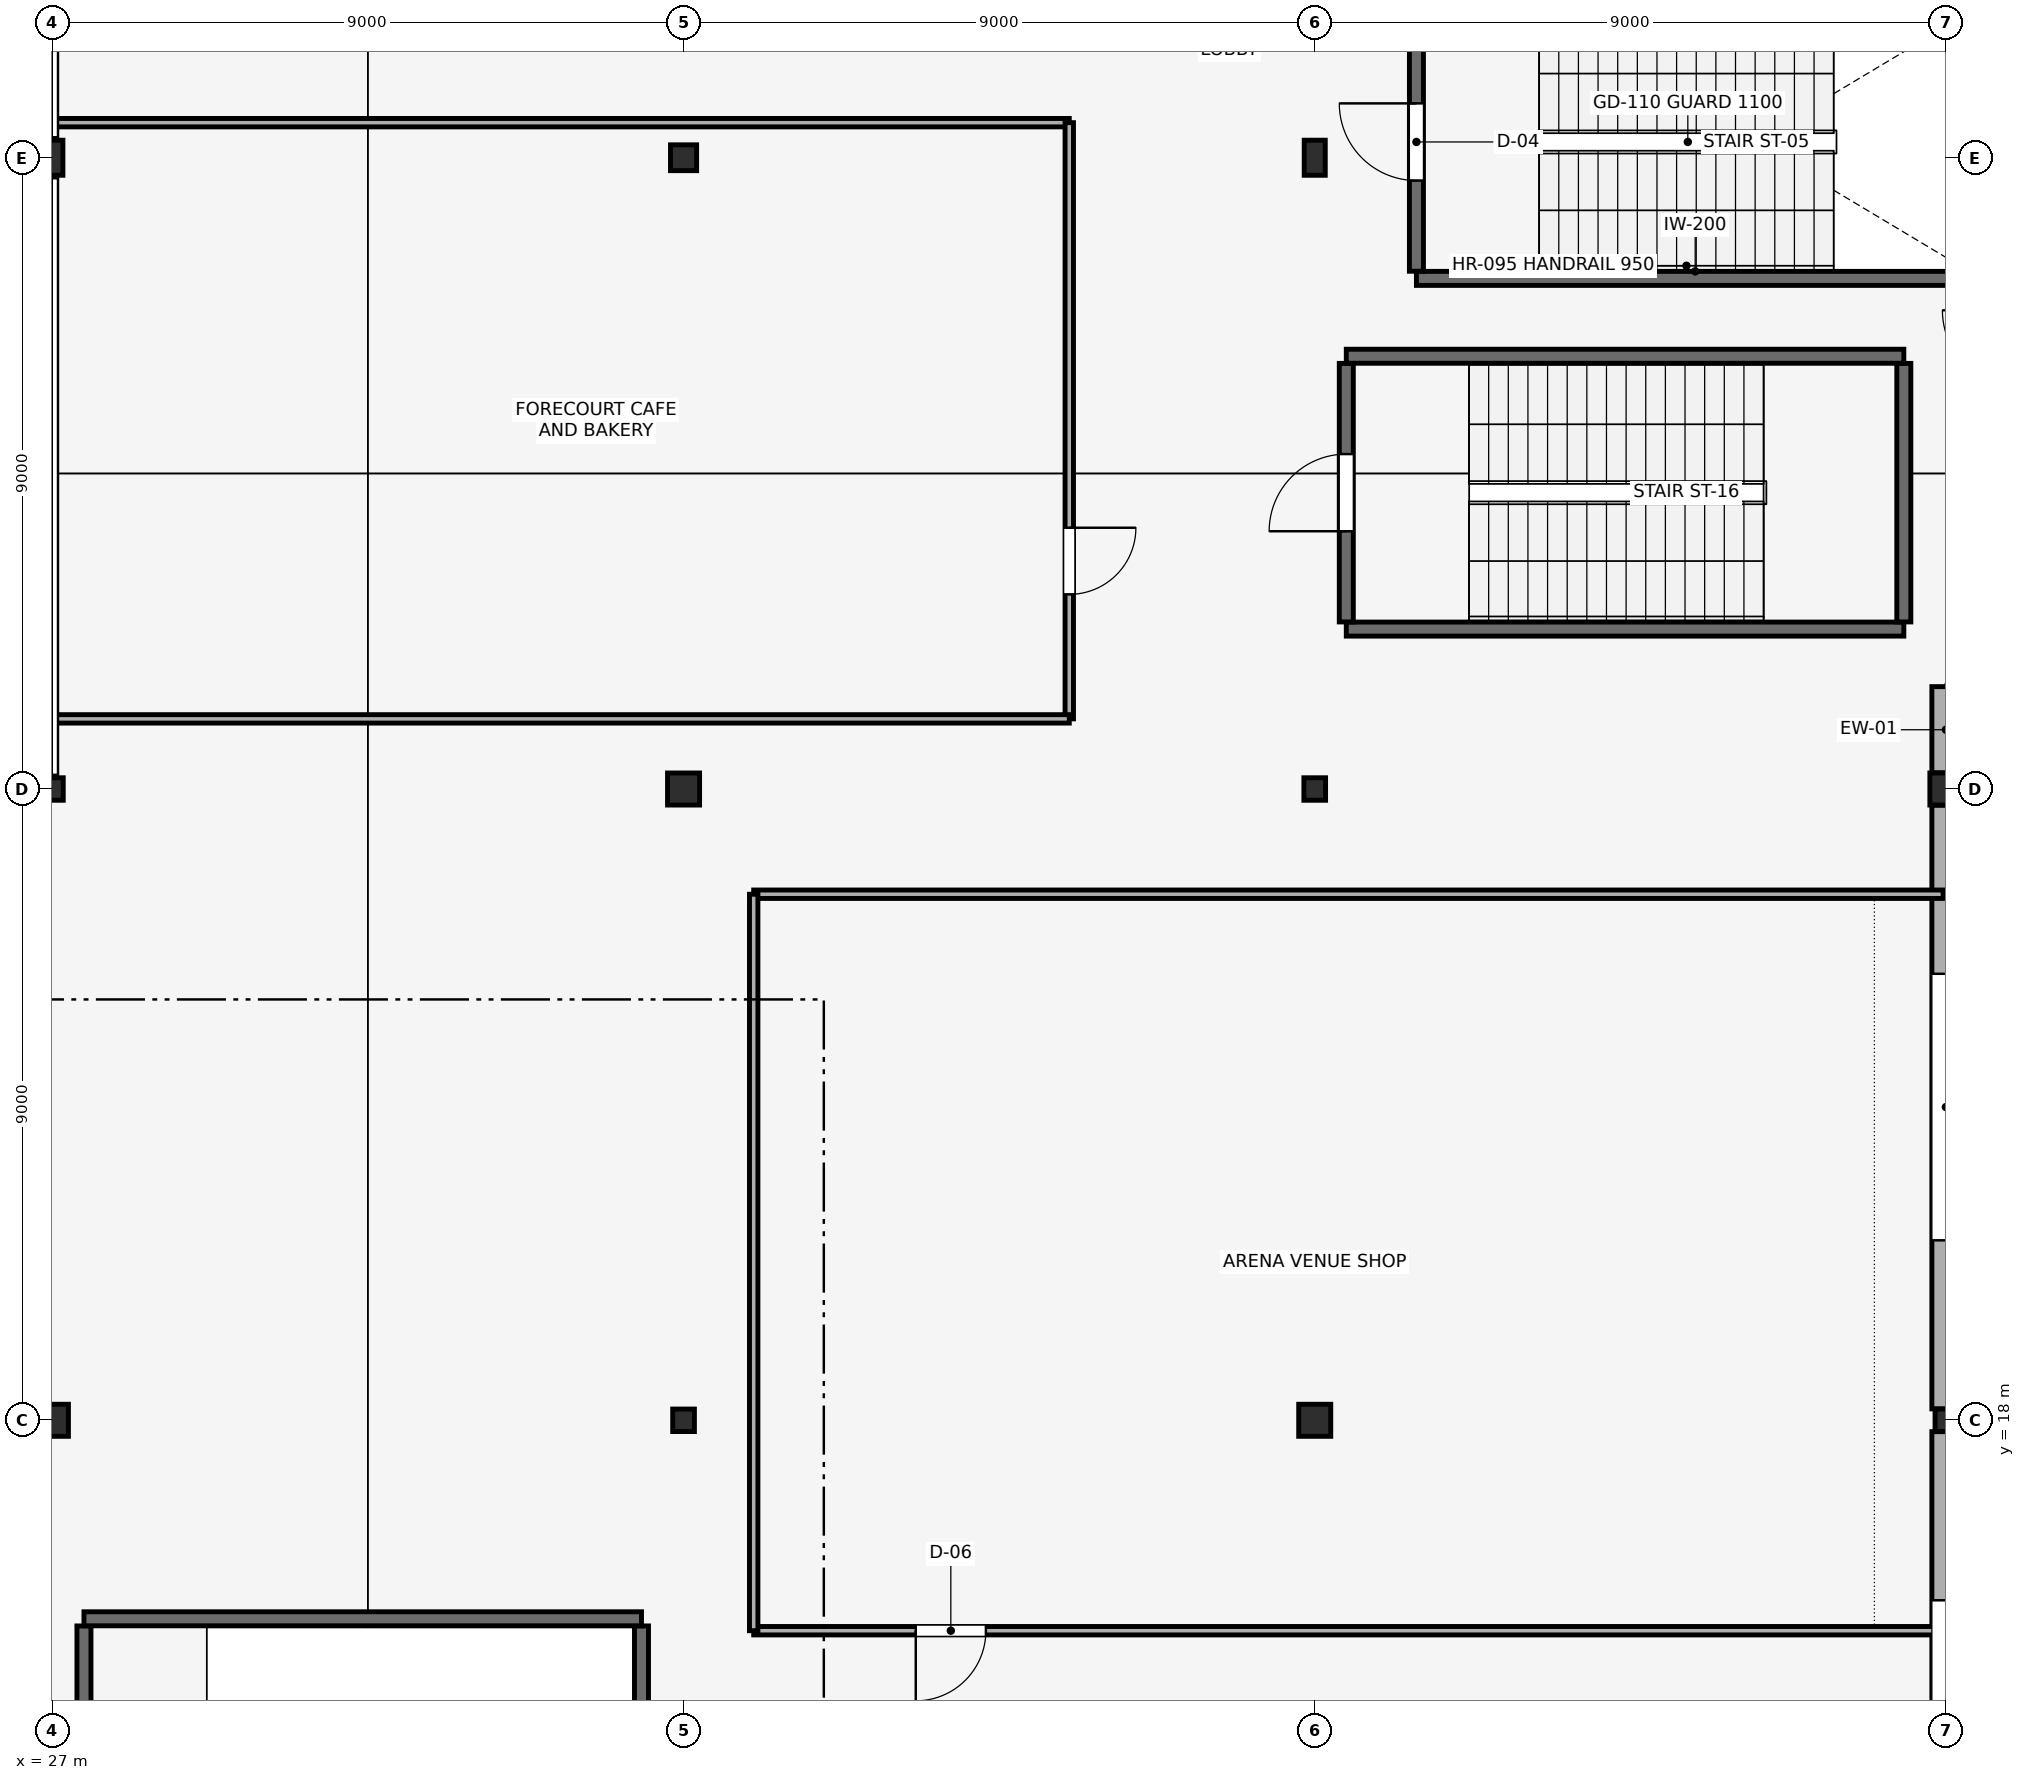
"""IFC4 building model, lengths in metres.
Left out: names, types, materials, properties, quantities, classifications, styles, units other than length and angle.
Written with IfcOpenShell. Run it as: python <this file> out.ifc"""

import sys

from ifc_helpers import new_model, si_unit, direction, frame, frame_2d, origin, origin_2d, place, context, subcontext, project, spatial, rectangle, hollow_circle, i_section, extrude, element, fill, save


model = new_model("IFC4")
c1 = context("Model", 3, precision=1e-05, world=origin(), true_north=direction((0.0, 1.0)))
c2 = subcontext(c1, "Body", "Model", "MODEL_VIEW")
j1 = project(units=[si_unit("LENGTHUNIT", "METRE"), si_unit("PLANEANGLEUNIT", "RADIAN")], contexts=[c1])
p1 = place(None, origin())
s1 = spatial("IfcSite", under=j1, at=p1, CompositionType="ELEMENT")
p2 = place(p1, origin())
s2 = spatial("IfcBuilding", under=s1, at=p2, CompositionType="ELEMENT")
p3 = place(p2, origin())
s3 = spatial("IfcBuildingStorey", under=s2, at=p3, CompositionType="ELEMENT", Elevation=0.0)
p4 = place(p3, frame((27.0, 18.0, 0.0), z_axis=(0.0, 0.0, 1.0), x_axis=(1.0, 0.0, 0.0)))
e1 = element("IfcColumn", 1, at=p4, inside=s3, PredefinedType="COLUMN", context=c2, shape_type="SweptSolid", body=[
    extrude(hollow_circle(Radius=0.229, WallThickness=0.02, at=origin_2d()), origin(), (0.0, 0.0, 1.0), 5.4),
])
p5 = place(p3, frame((27.0, 27.0, 0.0), z_axis=(0.0, 0.0, 1.0), x_axis=(1.0, 0.0, 0.0)))
e2 = element("IfcColumn", 2, at=p5, inside=s3, PredefinedType="COLUMN", context=c2, shape_type="SweptSolid", body=[
    extrude(i_section(OverallWidth=0.309, OverallDepth=0.321, WebThickness=0.014, FlangeThickness=0.022, FilletRadius=0.015, at=origin_2d()), origin(), (0.0, 0.0, 1.0), 5.4),
])
p6 = place(p3, frame((27.0, 36.0, 0.0), z_axis=(0.0, 0.0, 1.0), x_axis=(1.0, 0.0, 0.0)))
e3 = element("IfcColumn", 3, at=p6, inside=s3, PredefinedType="COLUMN", context=c2, shape_type="SweptSolid", body=[
    extrude(i_section(OverallWidth=0.3, OverallDepth=0.5, WebThickness=0.014, FlangeThickness=0.028, FilletRadius=0.027, at=origin_2d()), origin(), (0.0, 0.0, 1.0), 5.4),
])
p7 = place(p3, frame((36.0, 18.0, 0.0), z_axis=(0.0, 0.0, 1.0), x_axis=(1.0, 0.0, 0.0)))
e4 = element("IfcColumn", 4, at=p7, inside=s3, PredefinedType="COLUMN", context=c2, shape_type="SweptSolid", body=[
    extrude(i_section(OverallWidth=0.309, OverallDepth=0.321, WebThickness=0.014, FlangeThickness=0.022, FilletRadius=0.015, at=origin_2d()), origin(), (0.0, 0.0, 1.0), 5.4),
])
p8 = place(p3, frame((36.0, 27.0, 0.0), z_axis=(0.0, 0.0, 1.0), x_axis=(1.0, 0.0, 0.0)))
e5 = element("IfcColumn", 5, at=p8, inside=s3, PredefinedType="COLUMN", context=c2, shape_type="SweptSolid", body=[
    extrude(hollow_circle(Radius=0.229, WallThickness=0.02, at=origin_2d()), origin(), (0.0, 0.0, 1.0), 5.4),
])
p9 = place(p3, frame((36.0, 36.0, 0.0), z_axis=(0.0, 0.0, 1.0), x_axis=(1.0, 0.0, 0.0)))
e6 = element("IfcColumn", 6, at=p9, inside=s3, PredefinedType="COLUMN", context=c2, shape_type="SweptSolid", body=[
    extrude(i_section(OverallWidth=0.373, OverallDepth=0.368, WebThickness=0.014, FlangeThickness=0.024, FilletRadius=0.015, at=origin_2d()), origin(), (0.0, 0.0, 1.0), 5.4),
])
p10 = place(p3, frame((45.0, 18.0, 0.0), z_axis=(0.0, 0.0, 1.0), x_axis=(1.0, 0.0, 0.0)))
e7 = element("IfcColumn", 7, at=p10, inside=s3, PredefinedType="COLUMN", context=c2, shape_type="SweptSolid", body=[
    extrude(hollow_circle(Radius=0.229, WallThickness=0.02, at=origin_2d()), origin(), (0.0, 0.0, 1.0), 5.4),
])
p11 = place(p3, frame((45.0, 27.0, 0.0), z_axis=(0.0, 0.0, 1.0), x_axis=(1.0, 0.0, 0.0)))
e8 = element("IfcColumn", 8, at=p11, inside=s3, PredefinedType="COLUMN", context=c2, shape_type="SweptSolid", body=[
    extrude(i_section(OverallWidth=0.309, OverallDepth=0.321, WebThickness=0.014, FlangeThickness=0.022, FilletRadius=0.015, at=origin_2d()), origin(), (0.0, 0.0, 1.0), 5.4),
])
p12 = place(p3, frame((45.0, 36.0, 0.0), z_axis=(0.0, 0.0, 1.0), x_axis=(1.0, 0.0, 0.0)))
e9 = element("IfcColumn", 9, at=p12, inside=s3, PredefinedType="COLUMN", context=c2, shape_type="SweptSolid", body=[
    extrude(i_section(OverallWidth=0.3, OverallDepth=0.5, WebThickness=0.014, FlangeThickness=0.028, FilletRadius=0.027, at=origin_2d()), origin(), (0.0, 0.0, 1.0), 5.4),
])
p13 = place(p3, frame((54.0, 18.0, 0.0), z_axis=(0.0, 0.0, 1.0), x_axis=(1.0, 0.0, 0.0)))
e10 = element("IfcColumn", 10, at=p13, inside=s3, PredefinedType="COLUMN", context=c2, shape_type="SweptSolid", body=[
    extrude(i_section(OverallWidth=0.309, OverallDepth=0.321, WebThickness=0.014, FlangeThickness=0.022, FilletRadius=0.015, at=origin_2d()), origin(), (0.0, 0.0, 1.0), 5.4),
])
p14 = place(p3, frame((54.0, 27.0, 0.0), z_axis=(0.0, 0.0, 1.0), x_axis=(1.0, 0.0, 0.0)))
e11 = element("IfcColumn", 11, at=p14, inside=s3, PredefinedType="COLUMN", context=c2, shape_type="SweptSolid", body=[
    extrude(hollow_circle(Radius=0.229, WallThickness=0.02, at=origin_2d()), origin(), (0.0, 0.0, 1.0), 5.4),
])
p15 = place(p3, frame((60.381, 25.692, 0.0), z_axis=(0.0, 0.0, 1.0), x_axis=(-0.917435204173, 0.397885217298, 0.0)))
e12 = element("IfcWall", 12, at=p15, inside=s3, PredefinedType="STANDARD", context=c2, shape_type="SweptSolid", body=[
    extrude(rectangle(XDim=6.955, YDim=0.4, at=frame_2d((3.478, 0.0))), origin(), (0.0, 0.0, 1.0), 5.12),
])
p16 = place(p15, frame((1.578, 0.0, 0.0)))
e13 = element("IfcOpeningElement", 13, at=p16, cuts=e12, PredefinedType="OPENING", context=c2, shape_type="SweptSolid", body=[
    extrude(rectangle(XDim=3.8, YDim=2.8, at=frame_2d((1.9, 1.4))), frame((0.0, 0.21, 0.0), z_axis=(0.0, -1.0, 0.0), x_axis=(1.0, 0.0, 0.0)), (0.0, 0.0, 1.0), 0.42),
])
p17 = place(p3, frame((54.0, 28.46, 0.0), z_axis=(0.0, 0.0, 1.0), x_axis=(0.0, -1.0, 0.0)))
e14 = element("IfcWall", 14, at=p17, inside=s3, PredefinedType="STANDARD", context=c2, shape_type="SweptSolid", body=[
    extrude(rectangle(XDim=1.229, YDim=0.4, at=frame_2d((0.615, 0.0))), origin(), (0.0, 0.0, 1.0), 5.12),
])
p18 = place(p3, frame((54.0, 26.77, 0.0), z_axis=(0.0, 0.0, 1.0), x_axis=(0.0, -1.0, 0.0)))
e15 = element("IfcWall", 15, at=p18, inside=s3, PredefinedType="STANDARD", context=c2, shape_type="SweptSolid", body=[
    extrude(rectangle(XDim=8.607, YDim=0.4, at=frame_2d((4.304, 0.0))), origin(), (0.0, 0.0, 1.0), 4.815),
])
p19 = place(p18, frame((2.404, 0.0, 0.0)))
e16 = element("IfcOpeningElement", 16, at=p19, cuts=e15, PredefinedType="OPENING", context=c2, shape_type="SweptSolid", body=[
    extrude(rectangle(XDim=3.8, YDim=2.8, at=frame_2d((1.9, 1.4))), frame((0.0, 0.21, 0.0), z_axis=(0.0, -1.0, 0.0), x_axis=(1.0, 0.0, 0.0)), (0.0, 0.0, 1.0), 0.42),
])
p20 = place(p3, frame((54.0, 17.838, 0.0), z_axis=(0.0, 0.0, 1.0), x_axis=(0.0, -1.0, 0.0)))
e17 = element("IfcWall", 17, at=p20, inside=s3, PredefinedType="STANDARD", context=c2, shape_type="SweptSolid", body=[
    extrude(rectangle(XDim=8.607, YDim=0.4, at=frame_2d((4.304, 0.0))), origin(), (0.0, 0.0, 1.0), 4.815),
])
p21 = place(p20, frame((2.404, 0.0, 0.0)))
e18 = element("IfcOpeningElement", 18, at=p21, cuts=e17, PredefinedType="OPENING", context=c2, shape_type="SweptSolid", body=[
    extrude(rectangle(XDim=3.8, YDim=2.8, at=frame_2d((1.9, 1.4))), frame((0.0, 0.21, 0.0), z_axis=(0.0, -1.0, 0.0), x_axis=(1.0, 0.0, 0.0)), (0.0, 0.0, 1.0), 0.42),
])
p22 = place(p3, frame((46.45, 34.28, 0.0), z_axis=(0.0, 0.0, 1.0), x_axis=(1.0, 0.0, 0.0)))
e19 = element("IfcWall", 19, at=p22, inside=s3, PredefinedType="SHEAR", context=c2, shape_type="SweptSolid", body=[
    extrude(rectangle(XDim=7.95, YDim=0.2, at=frame_2d((3.975, 0.0))), origin(), (0.0, 0.0, 1.0), 5.4),
])
p23 = place(p3, frame((46.45, 34.382, 0.0), z_axis=(0.0, 0.0, 1.0), x_axis=(0.0, 1.0, 0.0)))
e20 = element("IfcWall", 20, at=p23, inside=s3, PredefinedType="SHEAR", context=c2, shape_type="SweptSolid", body=[
    extrude(rectangle(XDim=3.686, YDim=0.2, at=frame_2d((1.843, 0.0))), origin(), (0.0, 0.0, 1.0), 5.4),
])
p24 = place(p23, frame((1.293, 0.0, 0.0)))
e21 = element("IfcOpeningElement", 21, at=p24, cuts=e20, PredefinedType="OPENING", context=c2, shape_type="SweptSolid", body=[
    extrude(rectangle(XDim=1.1, YDim=2.15, at=frame_2d((0.55, 1.075))), frame((0.0, 0.11, 0.0), z_axis=(0.0, -1.0, 0.0), x_axis=(1.0, 0.0, 0.0)), (0.0, 0.0, 1.0), 0.22),
])
p25 = place(p3, frame((45.45, 29.28, 0.0), z_axis=(0.0, 0.0, 1.0), x_axis=(1.0, 0.0, 0.0)))
e22 = element("IfcWall", 22, at=p25, inside=s3, PredefinedType="SHEAR", context=c2, shape_type="SweptSolid", body=[
    extrude(rectangle(XDim=7.95, YDim=0.2, at=frame_2d((3.975, 0.0))), origin(), (0.0, 0.0, 1.0), 5.4),
])
p26 = place(p3, frame((45.45, 29.382, 0.0), z_axis=(0.0, 0.0, 1.0), x_axis=(0.0, 1.0, 0.0)))
e23 = element("IfcWall", 23, at=p26, inside=s3, PredefinedType="SHEAR", context=c2, shape_type="SweptSolid", body=[
    extrude(rectangle(XDim=3.686, YDim=0.2, at=frame_2d((1.843, 0.0))), origin(), (0.0, 0.0, 1.0), 5.4),
])
p27 = place(p26, frame((1.293, 0.0, 0.0)))
e24 = element("IfcOpeningElement", 24, at=p27, cuts=e23, PredefinedType="OPENING", context=c2, shape_type="SweptSolid", body=[
    extrude(rectangle(XDim=1.1, YDim=2.15, at=frame_2d((0.55, 1.075))), frame((0.0, 0.11, 0.0), z_axis=(0.0, -1.0, 0.0), x_axis=(1.0, 0.0, 0.0)), (0.0, 0.0, 1.0), 0.22),
])
p28 = place(p3, frame((53.4, 29.382, 0.0), z_axis=(0.0, 0.0, 1.0), x_axis=(0.0, 1.0, 0.0)))
e25 = element("IfcWall", 25, at=p28, inside=s3, PredefinedType="SHEAR", context=c2, shape_type="SweptSolid", body=[
    extrude(rectangle(XDim=3.686, YDim=0.2, at=frame_2d((1.843, 0.0))), origin(), (0.0, 0.0, 1.0), 5.4),
])
p29 = place(p3, frame((45.45, 33.17, 0.0), z_axis=(0.0, 0.0, 1.0), x_axis=(1.0, 0.0, 0.0)))
e26 = element("IfcWall", 26, at=p29, inside=s3, PredefinedType="SHEAR", context=c2, shape_type="SweptSolid", body=[
    extrude(rectangle(XDim=7.95, YDim=0.2, at=frame_2d((3.975, 0.0))), origin(), (0.0, 0.0, 1.0), 5.4),
])
p30 = place(p3, frame((27.45, 11.382, 0.0), z_axis=(0.0, 0.0, 1.0), x_axis=(0.0, 1.0, 0.0)))
e27 = element("IfcWall", 27, at=p30, inside=s3, PredefinedType="SHEAR", context=c2, shape_type="SweptSolid", body=[
    extrude(rectangle(XDim=3.686, YDim=0.2, at=frame_2d((1.843, 0.0))), origin(), (0.0, 0.0, 1.0), 5.4),
])
p31 = place(p30, frame((1.293, 0.0, 0.0)))
e28 = element("IfcOpeningElement", 28, at=p31, cuts=e27, PredefinedType="OPENING", context=c2, shape_type="SweptSolid", body=[
    extrude(rectangle(XDim=1.1, YDim=2.15, at=frame_2d((0.55, 1.075))), frame((0.0, 0.11, 0.0), z_axis=(0.0, -1.0, 0.0), x_axis=(1.0, 0.0, 0.0)), (0.0, 0.0, 1.0), 0.22),
])
p32 = place(p3, frame((35.4, 11.382, 0.0), z_axis=(0.0, 0.0, 1.0), x_axis=(0.0, 1.0, 0.0)))
e29 = element("IfcWall", 29, at=p32, inside=s3, PredefinedType="SHEAR", context=c2, shape_type="SweptSolid", body=[
    extrude(rectangle(XDim=3.686, YDim=0.2, at=frame_2d((1.843, 0.0))), origin(), (0.0, 0.0, 1.0), 5.4),
])
p33 = place(p3, frame((27.45, 15.17, 0.0), z_axis=(0.0, 0.0, 1.0), x_axis=(1.0, 0.0, 0.0)))
e30 = element("IfcWall", 30, at=p33, inside=s3, PredefinedType="SHEAR", context=c2, shape_type="SweptSolid", body=[
    extrude(rectangle(XDim=7.95, YDim=0.2, at=frame_2d((3.975, 0.0))), origin(), (0.0, 0.0, 1.0), 5.4),
])
p34 = place(p3, frame((37.0, 25.5, 0.0), z_axis=(0.0, 0.0, 1.0), x_axis=(1.0, 0.0, 0.0)))
e31 = element("IfcWall", 31, at=p34, inside=s3, PredefinedType="PARTITIONING", context=c2, shape_type="SweptSolid", body=[
    extrude(rectangle(XDim=16.96, YDim=0.12, at=frame_2d((8.48, 0.0))), origin(), (0.0, 0.0, 1.0), 5.12),
])
p35 = place(p3, frame((53.96, 15.0, 0.0), z_axis=(0.0, 0.0, 1.0), x_axis=(-1.0, 0.0, 0.0)))
e32 = element("IfcWall", 32, at=p35, inside=s3, PredefinedType="PARTITIONING", context=c2, shape_type="SweptSolid", body=[
    extrude(rectangle(XDim=16.96, YDim=0.12, at=frame_2d((8.48, 0.0))), origin(), (0.0, 0.0, 1.0), 4.658),
])
p36 = place(p35, frame((13.649, 0.0, 0.0)))
e33 = element("IfcOpeningElement", 33, at=p36, cuts=e32, PredefinedType="OPENING", context=c2, shape_type="SweptSolid", body=[
    extrude(rectangle(XDim=1.0, YDim=2.15, at=frame_2d((0.5, 1.075))), frame((0.0, 0.07, 0.0), z_axis=(0.0, -1.0, 0.0), x_axis=(1.0, 0.0, 0.0)), (0.0, 0.0, 1.0), 0.14),
])
p37 = place(p3, frame((37.0, 15.0, 0.0), z_axis=(0.0, 0.0, 1.0), x_axis=(0.0, 1.0, 0.0)))
e34 = element("IfcWall", 34, at=p37, inside=s3, PredefinedType="PARTITIONING", context=c2, shape_type="SweptSolid", body=[
    extrude(rectangle(XDim=10.5, YDim=0.12, at=frame_2d((5.25, 0.0))), origin(), (0.0, 0.0, 1.0), 5.12),
])
p38 = place(p3, frame((27.02, 36.5, 0.0), z_axis=(0.0, 0.0, 1.0), x_axis=(1.0, 0.0, 0.0)))
e35 = element("IfcWall", 35, at=p38, inside=s3, PredefinedType="PARTITIONING", context=c2, shape_type="SweptSolid", body=[
    extrude(rectangle(XDim=14.48, YDim=0.12, at=frame_2d((7.24, 0.0))), origin(), (0.0, 0.0, 1.0), 5.12),
])
p39 = place(p3, frame((41.5, 36.5, 0.0), z_axis=(0.0, 0.0, 1.0), x_axis=(0.0, -1.0, 0.0)))
e36 = element("IfcWall", 36, at=p39, inside=s3, PredefinedType="PARTITIONING", context=c2, shape_type="SweptSolid", body=[
    extrude(rectangle(XDim=8.5, YDim=0.12, at=frame_2d((4.25, 0.0))), origin(), (0.0, 0.0, 1.0), 5.12),
])
p40 = place(p39, frame((5.775, 0.0, 0.0)))
e37 = element("IfcOpeningElement", 37, at=p40, cuts=e36, PredefinedType="OPENING", context=c2, shape_type="SweptSolid", body=[
    extrude(rectangle(XDim=0.95, YDim=2.1, at=frame_2d((0.475, 1.05))), frame((0.0, 0.07, 0.0), z_axis=(0.0, -1.0, 0.0), x_axis=(1.0, 0.0, 0.0)), (0.0, 0.0, 1.0), 0.14),
])
p41 = place(p3, frame((41.5, 28.0, 0.0), z_axis=(0.0, 0.0, 1.0), x_axis=(-1.0, 0.0, 0.0)))
e38 = element("IfcWall", 38, at=p41, inside=s3, PredefinedType="PARTITIONING", context=c2, shape_type="SweptSolid", body=[
    extrude(rectangle(XDim=14.48, YDim=0.12, at=frame_2d((7.24, 0.0))), origin(), (0.0, 0.0, 1.0), 5.12),
])
p42 = place(p19, origin())
e39 = element("IfcDoor", 39, at=p42, inside=s3, OperationType="DOUBLE_DOOR_SINGLE_SWING", PredefinedType="DOOR", context=c2, shape_type="SweptSolid", body=[
    extrude(rectangle(XDim=3.8, YDim=2.8, at=frame_2d((1.9, 1.4))), frame((0.0, 0.025, 0.0), z_axis=(0.0, -1.0, 0.0), x_axis=(1.0, 0.0, 0.0)), (0.0, 0.0, 1.0), 0.05),
])
fill(e16, e39)
p43 = place(p21, origin())
e40 = element("IfcDoor", 40, at=p43, inside=s3, OperationType="DOUBLE_DOOR_SINGLE_SWING", PredefinedType="DOOR", context=c2, shape_type="SweptSolid", body=[
    extrude(rectangle(XDim=3.8, YDim=2.8, at=frame_2d((1.9, 1.4))), frame((0.0, 0.025, 0.0), z_axis=(0.0, -1.0, 0.0), x_axis=(1.0, 0.0, 0.0)), (0.0, 0.0, 1.0), 0.05),
])
fill(e18, e40)
p44 = place(p24, frame((1.1, 0.0, 0.0), z_axis=(0.0, 0.0, 1.0), x_axis=(-1.0, 0.0, 0.0)))
e41 = element("IfcDoor", 41, at=p44, inside=s3, OperationType="SINGLE_SWING_LEFT", PredefinedType="DOOR", context=c2, shape_type="SweptSolid", body=[
    extrude(rectangle(XDim=1.1, YDim=2.15, at=frame_2d((0.55, 1.075))), frame((0.0, 0.025, 0.0), z_axis=(0.0, -1.0, 0.0), x_axis=(1.0, 0.0, 0.0)), (0.0, 0.0, 1.0), 0.05),
])
fill(e21, e41)
p45 = place(p27, frame((1.1, 0.0, 0.0), z_axis=(0.0, 0.0, 1.0), x_axis=(-1.0, 0.0, 0.0)))
e42 = element("IfcDoor", 42, at=p45, inside=s3, OperationType="SINGLE_SWING_RIGHT", PredefinedType="DOOR", context=c2, shape_type="SweptSolid", body=[
    extrude(rectangle(XDim=1.1, YDim=2.15, at=frame_2d((0.55, 1.075))), frame((0.0, 0.025, 0.0), z_axis=(0.0, -1.0, 0.0), x_axis=(1.0, 0.0, 0.0)), (0.0, 0.0, 1.0), 0.05),
])
fill(e24, e42)
p46 = place(p36, origin())
e43 = element("IfcDoor", 43, at=p46, inside=s3, OperationType="SINGLE_SWING_RIGHT", PredefinedType="DOOR", context=c2, shape_type="SweptSolid", body=[
    extrude(rectangle(XDim=1.0, YDim=2.15, at=frame_2d((0.5, 1.075))), frame((0.0, 0.025, 0.0), z_axis=(0.0, -1.0, 0.0), x_axis=(1.0, 0.0, 0.0)), (0.0, 0.0, 1.0), 0.05),
])
fill(e33, e43)
p47 = place(p40, origin())
e44 = element("IfcDoor", 44, at=p47, inside=s3, OperationType="SINGLE_SWING_LEFT", PredefinedType="DOOR", context=c2, shape_type="SweptSolid", body=[
    extrude(rectangle(XDim=0.95, YDim=2.1, at=frame_2d((0.475, 1.05))), frame((0.0, 0.025, 0.0), z_axis=(0.0, -1.0, 0.0), x_axis=(1.0, 0.0, 0.0)), (0.0, 0.0, 1.0), 0.05),
])
fill(e37, e44)
save(model, sys.argv[1])
